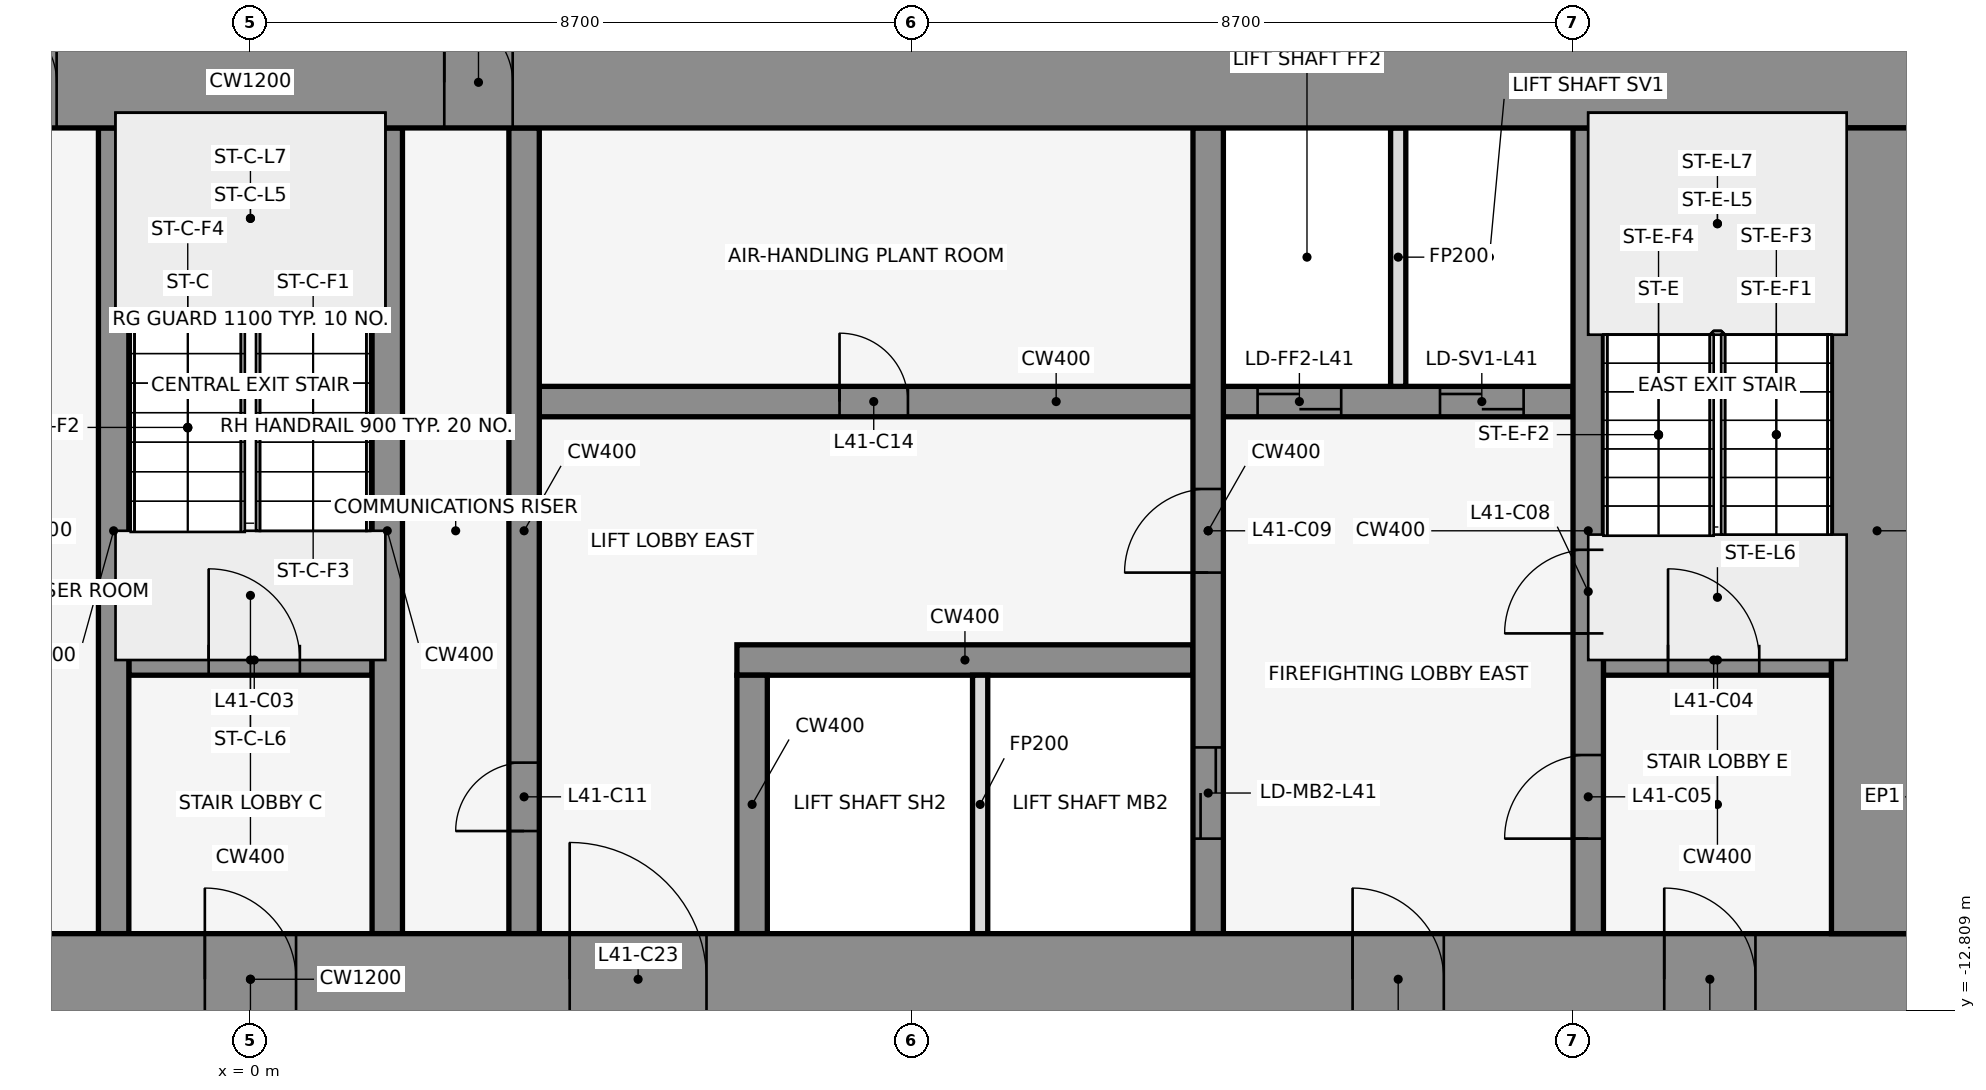
"""IFC4 building model, lengths in metres.
Left out: names, types, materials, properties, quantities, classifications, styles, units other than length and angle.
Written with IfcOpenShell. Run it as: python <this file> out.ifc"""

import sys

from ifc_helpers import new_model, si_unit, direction, frame, frame_2d, origin, place, context, subcontext, project, spatial, rectangle, extrude, element, fill, save


model = new_model("IFC4")
c1 = context("Model", 3, precision=1e-05, world=origin(), true_north=direction((0.0, 1.0)))
c2 = subcontext(c1, "Body", "Model", "MODEL_VIEW")
j1 = project(units=[si_unit("LENGTHUNIT", "METRE"), si_unit("PLANEANGLEUNIT", "RADIAN")], contexts=[c1])
p1 = place(None, origin())
s1 = spatial("IfcSite", under=j1, at=p1, CompositionType="ELEMENT")
p2 = place(p1, origin())
s2 = spatial("IfcBuilding", under=s1, at=p2, CompositionType="ELEMENT")
p3 = place(p2, frame((0.0, 0.0, 185.5)))
s3 = spatial("IfcBuildingStorey", under=s2, at=p3, CompositionType="ELEMENT", Elevation=185.5)
for number, where, z_axis, x_axis in (
    (1, (16.432, -0.105, 0.0), (0.0, 0.0, 1.0), (-0.84, 0.543, 0.0)),
    (2, (1.901, 1.08, 0.0), (0.0, 0.0, 1.0), (-0.84, -0.543, 0.0)),
    (3, (-0.068, -0.105, 0.0), (0.0, 0.0, 1.0), (-0.84, 0.543, 0.0)),
):
    element("IfcWall", number, at=place(p3, frame(where, z_axis=z_axis, x_axis=x_axis)), inside=s3, PredefinedType="STANDARD", context=c2, shape_type="SweptSolid", body=[
        extrude(rectangle(XDim=2.183, YDim=0.25, at=frame_2d((1.091, 0.0))), origin(), (0.0, 0.0, 1.0), 5.25),
    ])
p4 = place(p3, frame((-1.6, -8.2, 0.0), z_axis=(0.0, 0.0, 1.0), x_axis=(1.0, 0.0, 0.0)))
e4 = element("IfcWall", 4, at=p4, inside=s3, PredefinedType="SHEAR", context=c2, shape_type="SweptSolid", body=[
    extrude(rectangle(XDim=3.2, YDim=0.4, at=frame_2d((1.6, 0.0))), origin(), (0.0, 0.0, 1.0), 5.4),
])
p5 = place(p4, frame((1.05, 0.0, 0.0)))
e5 = element("IfcOpeningElement", 5, at=p5, cuts=e4, PredefinedType="OPENING", context=c2, shape_type="SweptSolid", body=[
    extrude(rectangle(XDim=1.2, YDim=2.1, at=frame_2d((0.6, 1.05))), frame((0.0, 0.212, 0.0), z_axis=(0.0, -1.0, 0.0), x_axis=(1.0, 0.0, 0.0)), (0.0, 0.0, 1.0), 0.424),
])
p6 = place(p3, frame((6.4, -8.2, 0.0), z_axis=(0.0, 0.0, 1.0), x_axis=(1.0, 0.0, 0.0)))
e6 = element("IfcWall", 6, at=p6, inside=s3, PredefinedType="SHEAR", context=c2, shape_type="SweptSolid", body=[
    extrude(rectangle(XDim=6.0, YDim=0.4, at=frame_2d((3.0, 0.0))), origin(), (0.0, 0.0, 1.0), 5.4),
])
p7 = place(p3, frame((17.8, -8.2, 0.0), z_axis=(0.0, 0.0, 1.0), x_axis=(1.0, 0.0, 0.0)))
e7 = element("IfcWall", 7, at=p7, inside=s3, PredefinedType="SHEAR", context=c2, shape_type="SweptSolid", body=[
    extrude(rectangle(XDim=3.0, YDim=0.4, at=frame_2d((1.5, 0.0))), origin(), (0.0, 0.0, 1.0), 5.4),
])
p8 = place(p7, frame((0.85, 0.0, 0.0)))
e8 = element("IfcOpeningElement", 8, at=p8, cuts=e7, PredefinedType="OPENING", context=c2, shape_type="SweptSolid", body=[
    extrude(rectangle(XDim=1.2, YDim=2.1, at=frame_2d((0.6, 1.05))), frame((0.0, 0.212, 0.0), z_axis=(0.0, -1.0, 0.0), x_axis=(1.0, 0.0, 0.0)), (0.0, 0.0, 1.0), 0.424),
])
p9 = place(p3, frame((3.8, -4.8, 0.0), z_axis=(0.0, 0.0, 1.0), x_axis=(1.0, 0.0, 0.0)))
e9 = element("IfcWall", 9, at=p9, inside=s3, PredefinedType="SHEAR", context=c2, shape_type="SweptSolid", body=[
    extrude(rectangle(XDim=13.6, YDim=0.4, at=frame_2d((6.8, 0.0))), origin(), (0.0, 0.0, 1.0), 5.4),
])
p10 = place(p9, frame((9.45, 0.0, 0.0)))
e10 = element("IfcOpeningElement", 10, at=p10, cuts=e9, PredefinedType="OPENING", context=c2, shape_type="SweptSolid", body=[
    extrude(rectangle(XDim=1.1, YDim=2.1, at=frame_2d((0.55, 1.05))), frame((0.0, 0.212, 0.0), z_axis=(0.0, -1.0, 0.0), x_axis=(1.0, 0.0, 0.0)), (0.0, 0.0, 1.0), 0.424),
])
p11 = place(p9, frame((11.85, 0.0, 0.0)))
e11 = element("IfcOpeningElement", 11, at=p11, cuts=e9, PredefinedType="OPENING", context=c2, shape_type="SweptSolid", body=[
    extrude(rectangle(XDim=1.1, YDim=2.1, at=frame_2d((0.55, 1.05))), frame((0.0, 0.212, 0.0), z_axis=(0.0, -1.0, 0.0), x_axis=(1.0, 0.0, 0.0)), (0.0, 0.0, 1.0), 0.424),
])
p12 = place(p9, frame((3.95, 0.0, 0.0)))
e12 = element("IfcOpeningElement", 12, at=p12, cuts=e9, PredefinedType="OPENING", context=c2, shape_type="SweptSolid", body=[
    extrude(rectangle(XDim=0.9, YDim=2.1, at=frame_2d((0.45, 1.05))), frame((0.0, 0.212, 0.0), z_axis=(0.0, -1.0, 0.0), x_axis=(1.0, 0.0, 0.0)), (0.0, 0.0, 1.0), 0.424),
])
for number, where, z_axis, x_axis in (
    (13, (-1.8, -11.8, 0.0), (0.0, 0.0, 1.0), (0.0, 1.0, 0.0)),
    (14, (1.8, -11.8, 0.0), (0.0, 0.0, 1.0), (0.0, 1.0, 0.0)),
):
    element("IfcWall", number, at=place(p3, frame(where, z_axis=z_axis, x_axis=x_axis)), inside=s3, PredefinedType="SHEAR", context=c2, shape_type="SweptSolid", body=[
        extrude(rectangle(XDim=10.6, YDim=0.4, at=frame_2d((5.3, 0.0))), origin(), (0.0, 0.0, 1.0), 5.4),
    ])
p13 = place(p3, frame((3.6, -11.8, 0.0), z_axis=(0.0, 0.0, 1.0), x_axis=(0.0, 1.0, 0.0)))
e15 = element("IfcWall", 15, at=p13, inside=s3, PredefinedType="SHEAR", context=c2, shape_type="SweptSolid", body=[
    extrude(rectangle(XDim=10.6, YDim=0.4, at=frame_2d((5.3, 0.0))), origin(), (0.0, 0.0, 1.0), 5.4),
])
p14 = place(p13, frame((1.35, 0.0, 0.0)))
e16 = element("IfcOpeningElement", 16, at=p14, cuts=e15, PredefinedType="OPENING", context=c2, shape_type="SweptSolid", body=[
    extrude(rectangle(XDim=0.9, YDim=2.1, at=frame_2d((0.45, 1.05))), frame((0.0, 0.212, 0.0), z_axis=(0.0, -1.0, 0.0), x_axis=(1.0, 0.0, 0.0)), (0.0, 0.0, 1.0), 0.424),
])
p15 = place(p3, frame((6.6, -11.8, 0.0), z_axis=(0.0, 0.0, 1.0), x_axis=(0.0, 1.0, 0.0)))
e17 = element("IfcWall", 17, at=p15, inside=s3, PredefinedType="SHEAR", context=c2, shape_type="SweptSolid", body=[
    extrude(rectangle(XDim=3.4, YDim=0.4, at=frame_2d((1.7, 0.0))), origin(), (0.0, 0.0, 1.0), 5.4),
])
p16 = place(p3, frame((9.6, -11.8, 0.0), z_axis=(0.0, 0.0, 1.0), x_axis=(0.0, 1.0, 0.0)))
e18 = element("IfcWall", 18, at=p16, inside=s3, PredefinedType="PARTITIONING", context=c2, shape_type="SweptSolid", body=[
    extrude(rectangle(XDim=3.4, YDim=0.2, at=frame_2d((1.7, 0.0))), origin(), (0.0, 0.0, 1.0), 4.26),
])
p17 = place(p3, frame((12.6, -11.8, 0.0), z_axis=(0.0, 0.0, 1.0), x_axis=(0.0, 1.0, 0.0)))
e19 = element("IfcWall", 19, at=p17, inside=s3, PredefinedType="SHEAR", context=c2, shape_type="SweptSolid", body=[
    extrude(rectangle(XDim=10.6, YDim=0.4, at=frame_2d((5.3, 0.0))), origin(), (0.0, 0.0, 1.0), 5.4),
])
p18 = place(p17, frame((1.25, 0.0, 0.0)))
e20 = element("IfcOpeningElement", 20, at=p18, cuts=e19, PredefinedType="OPENING", context=c2, shape_type="SweptSolid", body=[
    extrude(rectangle(XDim=1.2, YDim=2.1, at=frame_2d((0.6, 1.05))), frame((0.0, 0.212, 0.0), z_axis=(0.0, -1.0, 0.0), x_axis=(1.0, 0.0, 0.0)), (0.0, 0.0, 1.0), 0.424),
])
p19 = place(p17, frame((4.75, 0.0, 0.0)))
e21 = element("IfcOpeningElement", 21, at=p19, cuts=e19, PredefinedType="OPENING", context=c2, shape_type="SweptSolid", body=[
    extrude(rectangle(XDim=1.1, YDim=2.1, at=frame_2d((0.55, 1.05))), frame((0.0, 0.212, 0.0), z_axis=(0.0, -1.0, 0.0), x_axis=(1.0, 0.0, 0.0)), (0.0, 0.0, 1.0), 0.424),
])
p20 = place(p3, frame((15.1, -4.6, 0.0), z_axis=(0.0, 0.0, 1.0), x_axis=(0.0, 1.0, 0.0)))
e22 = element("IfcWall", 22, at=p20, inside=s3, PredefinedType="PARTITIONING", context=c2, shape_type="SweptSolid", body=[
    extrude(rectangle(XDim=3.4, YDim=0.2, at=frame_2d((1.7, 0.0))), origin(), (0.0, 0.0, 1.0), 4.26),
])
p21 = place(p3, frame((17.6, -11.8, 0.0), z_axis=(0.0, 0.0, 1.0), x_axis=(0.0, 1.0, 0.0)))
e23 = element("IfcWall", 23, at=p21, inside=s3, PredefinedType="SHEAR", context=c2, shape_type="SweptSolid", body=[
    extrude(rectangle(XDim=10.6, YDim=0.4, at=frame_2d((5.3, 0.0))), origin(), (0.0, 0.0, 1.0), 5.4),
])
p22 = place(p21, frame((1.25, 0.0, 0.0)))
e24 = element("IfcOpeningElement", 24, at=p22, cuts=e23, PredefinedType="OPENING", context=c2, shape_type="SweptSolid", body=[
    extrude(rectangle(XDim=1.1, YDim=2.1, at=frame_2d((0.55, 1.05))), frame((0.0, 0.212, 0.0), z_axis=(0.0, -1.0, 0.0), x_axis=(1.0, 0.0, 0.0)), (0.0, 0.0, 1.0), 0.424),
])
p23 = place(p21, frame((3.95, 0.0, 0.0)))
e25 = element("IfcOpeningElement", 25, at=p23, cuts=e23, PredefinedType="OPENING", context=c2, shape_type="SweptSolid", body=[
    extrude(rectangle(XDim=1.1, YDim=2.1, at=frame_2d((0.55, 1.05))), frame((0.0, 0.212, 0.0), z_axis=(0.0, -1.0, 0.0), x_axis=(1.0, 0.0, 0.0)), (0.0, 0.0, 1.0), 0.424),
])
p24 = place(p3, frame((-22.0, -0.6, 0.0), z_axis=(0.0, 0.0, 1.0), x_axis=(1.0, 0.0, 0.0)))
e26 = element("IfcWall", 26, at=p24, inside=s3, PredefinedType="SHEAR", context=c2, shape_type="SweptSolid", body=[
    extrude(rectangle(XDim=44.0, YDim=1.2, at=frame_2d((22.0, 0.0))), origin(), (0.0, 0.0, 1.0), 5.4),
])
p25 = place(p24, frame((18.55, 0.0, 0.0)))
e27 = element("IfcOpeningElement", 27, at=p25, cuts=e26, PredefinedType="OPENING", context=c2, shape_type="SweptSolid", body=[
    extrude(rectangle(XDim=0.9, YDim=2.1, at=frame_2d((0.45, 1.05))), frame((0.0, 0.612, 0.0), z_axis=(0.0, -1.0, 0.0), x_axis=(1.0, 0.0, 0.0)), (0.0, 0.0, 1.0), 1.224),
])
p26 = place(p24, frame((24.55, 0.0, 0.0)))
e28 = element("IfcOpeningElement", 28, at=p26, cuts=e26, PredefinedType="OPENING", context=c2, shape_type="SweptSolid", body=[
    extrude(rectangle(XDim=0.9, YDim=2.1, at=frame_2d((0.45, 1.05))), frame((0.0, 0.612, 0.0), z_axis=(0.0, -1.0, 0.0), x_axis=(1.0, 0.0, 0.0)), (0.0, 0.0, 1.0), 1.224),
])
p27 = place(p3, frame((-22.0, -12.4, 0.0), z_axis=(0.0, 0.0, 1.0), x_axis=(1.0, 0.0, 0.0)))
e29 = element("IfcWall", 29, at=p27, inside=s3, PredefinedType="SHEAR", context=c2, shape_type="SweptSolid", body=[
    extrude(rectangle(XDim=44.0, YDim=1.2, at=frame_2d((22.0, 0.0))), origin(), (0.0, 0.0, 1.0), 5.4),
])
p28 = place(p27, frame((2.2, 0.0, 0.0)))
e30 = element("IfcOpeningElement", 30, at=p28, cuts=e29, PredefinedType="OPENING", context=c2, shape_type="SweptSolid", body=[
    extrude(rectangle(XDim=1.2, YDim=2.1, at=frame_2d((0.6, 1.05))), frame((0.0, 0.612, 0.0), z_axis=(0.0, -1.0, 0.0), x_axis=(1.0, 0.0, 0.0)), (0.0, 0.0, 1.0), 1.224),
])
p29 = place(p27, frame((21.4, 0.0, 0.0)))
e31 = element("IfcOpeningElement", 31, at=p29, cuts=e29, PredefinedType="OPENING", context=c2, shape_type="SweptSolid", body=[
    extrude(rectangle(XDim=1.2, YDim=2.1, at=frame_2d((0.6, 1.05))), frame((0.0, 0.612, 0.0), z_axis=(0.0, -1.0, 0.0), x_axis=(1.0, 0.0, 0.0)), (0.0, 0.0, 1.0), 1.224),
])
p30 = place(p27, frame((40.6, 0.0, 0.0)))
e32 = element("IfcOpeningElement", 32, at=p30, cuts=e29, PredefinedType="OPENING", context=c2, shape_type="SweptSolid", body=[
    extrude(rectangle(XDim=1.2, YDim=2.1, at=frame_2d((0.6, 1.05))), frame((0.0, 0.612, 0.0), z_axis=(0.0, -1.0, 0.0), x_axis=(1.0, 0.0, 0.0)), (0.0, 0.0, 1.0), 1.224),
])
p31 = place(p27, frame((16.0, 0.0, 0.0)))
e33 = element("IfcOpeningElement", 33, at=p31, cuts=e29, PredefinedType="OPENING", context=c2, shape_type="SweptSolid", body=[
    extrude(rectangle(XDim=1.8, YDim=2.1, at=frame_2d((0.9, 1.05))), frame((0.0, 0.612, 0.0), z_axis=(0.0, -1.0, 0.0), x_axis=(1.0, 0.0, 0.0)), (0.0, 0.0, 1.0), 1.224),
])
p32 = place(p27, frame((6.3, 0.0, 0.0)))
e34 = element("IfcOpeningElement", 34, at=p32, cuts=e29, PredefinedType="OPENING", context=c2, shape_type="SweptSolid", body=[
    extrude(rectangle(XDim=1.2, YDim=2.1, at=frame_2d((0.6, 1.05))), frame((0.0, 0.612, 0.0), z_axis=(0.0, -1.0, 0.0), x_axis=(1.0, 0.0, 0.0)), (0.0, 0.0, 1.0), 1.224),
])
p33 = place(p27, frame((26.2, 0.0, 0.0)))
e35 = element("IfcOpeningElement", 35, at=p33, cuts=e29, PredefinedType="OPENING", context=c2, shape_type="SweptSolid", body=[
    extrude(rectangle(XDim=1.8, YDim=2.1, at=frame_2d((0.9, 1.05))), frame((0.0, 0.612, 0.0), z_axis=(0.0, -1.0, 0.0), x_axis=(1.0, 0.0, 0.0)), (0.0, 0.0, 1.0), 1.224),
])
p34 = place(p27, frame((36.5, 0.0, 0.0)))
e36 = element("IfcOpeningElement", 36, at=p34, cuts=e29, PredefinedType="OPENING", context=c2, shape_type="SweptSolid", body=[
    extrude(rectangle(XDim=1.2, YDim=2.1, at=frame_2d((0.6, 1.05))), frame((0.0, 0.612, 0.0), z_axis=(0.0, -1.0, 0.0), x_axis=(1.0, 0.0, 0.0)), (0.0, 0.0, 1.0), 1.224),
])
p35 = place(p3, frame((21.4, -11.8, 0.0), z_axis=(0.0, 0.0, 1.0), x_axis=(0.0, 1.0, 0.0)))
e37 = element("IfcWall", 37, at=p35, inside=s3, PredefinedType="SHEAR", context=c2, shape_type="SweptSolid", body=[
    extrude(rectangle(XDim=10.6, YDim=1.2, at=frame_2d((5.3, 0.0))), origin(), (0.0, 0.0, 1.0), 5.4),
])
p36 = place(p5, origin())
e38 = element("IfcDoor", 38, at=p36, inside=s3, OperationType="SINGLE_SWING_LEFT", PredefinedType="DOOR", context=c2, shape_type="SweptSolid", body=[
    extrude(rectangle(XDim=1.2, YDim=2.1, at=frame_2d((0.6, 1.05))), frame((0.0, 0.025, 0.0), z_axis=(0.0, -1.0, 0.0), x_axis=(1.0, 0.0, 0.0)), (0.0, 0.0, 1.0), 0.05),
])
fill(e5, e38)
p37 = place(p8, origin())
e39 = element("IfcDoor", 39, at=p37, inside=s3, OperationType="SINGLE_SWING_RIGHT", PredefinedType="DOOR", context=c2, shape_type="SweptSolid", body=[
    extrude(rectangle(XDim=1.2, YDim=2.1, at=frame_2d((0.6, 1.05))), frame((0.0, 0.025, 0.0), z_axis=(0.0, -1.0, 0.0), x_axis=(1.0, 0.0, 0.0)), (0.0, 0.0, 1.0), 0.05),
])
fill(e8, e39)
p38 = place(p22, origin())
e40 = element("IfcDoor", 40, at=p38, inside=s3, OperationType="SINGLE_SWING_LEFT", PredefinedType="DOOR", context=c2, shape_type="SweptSolid", body=[
    extrude(rectangle(XDim=1.1, YDim=2.1, at=frame_2d((0.55, 1.05))), frame((0.0, 0.025, 0.0), z_axis=(0.0, -1.0, 0.0), x_axis=(1.0, 0.0, 0.0)), (0.0, 0.0, 1.0), 0.05),
])
fill(e24, e40)
p39 = place(p18, origin())
e41 = element("IfcDoor", 41, at=p39, inside=s3, OperationType="DOUBLE_DOOR_SLIDING", PredefinedType="DOOR", context=c2, shape_type="SweptSolid", body=[
    extrude(rectangle(XDim=1.2, YDim=2.1, at=frame_2d((0.6, 1.05))), frame((0.0, 0.025, 0.0), z_axis=(0.0, -1.0, 0.0), x_axis=(1.0, 0.0, 0.0)), (0.0, 0.0, 1.0), 0.05),
])
fill(e20, e41)
p40 = place(p10, origin())
e42 = element("IfcDoor", 42, at=p40, inside=s3, OperationType="DOUBLE_DOOR_SLIDING", PredefinedType="DOOR", context=c2, shape_type="SweptSolid", body=[
    extrude(rectangle(XDim=1.1, YDim=2.1, at=frame_2d((0.55, 1.05))), frame((0.0, 0.025, 0.0), z_axis=(0.0, -1.0, 0.0), x_axis=(1.0, 0.0, 0.0)), (0.0, 0.0, 1.0), 0.05),
])
fill(e10, e42)
p41 = place(p11, origin())
e43 = element("IfcDoor", 43, at=p41, inside=s3, OperationType="DOUBLE_DOOR_SLIDING", PredefinedType="DOOR", context=c2, shape_type="SweptSolid", body=[
    extrude(rectangle(XDim=1.1, YDim=2.1, at=frame_2d((0.55, 1.05))), frame((0.0, 0.025, 0.0), z_axis=(0.0, -1.0, 0.0), x_axis=(1.0, 0.0, 0.0)), (0.0, 0.0, 1.0), 0.05),
])
fill(e11, e43)
p42 = place(p23, origin())
e44 = element("IfcDoor", 44, at=p42, inside=s3, OperationType="SINGLE_SWING_RIGHT", PredefinedType="DOOR", context=c2, shape_type="SweptSolid", body=[
    extrude(rectangle(XDim=1.1, YDim=2.1, at=frame_2d((0.55, 1.05))), frame((0.0, 0.025, 0.0), z_axis=(0.0, -1.0, 0.0), x_axis=(1.0, 0.0, 0.0)), (0.0, 0.0, 1.0), 0.05),
])
fill(e25, e44)
p43 = place(p19, frame((1.1, 0.0, 0.0), z_axis=(0.0, 0.0, 1.0), x_axis=(-1.0, 0.0, 0.0)))
e45 = element("IfcDoor", 45, at=p43, inside=s3, OperationType="SINGLE_SWING_RIGHT", PredefinedType="DOOR", context=c2, shape_type="SweptSolid", body=[
    extrude(rectangle(XDim=1.1, YDim=2.1, at=frame_2d((0.55, 1.05))), frame((0.0, 0.025, 0.0), z_axis=(0.0, -1.0, 0.0), x_axis=(1.0, 0.0, 0.0)), (0.0, 0.0, 1.0), 0.05),
])
fill(e21, e45)
p44 = place(p14, origin())
e46 = element("IfcDoor", 46, at=p44, inside=s3, OperationType="SINGLE_SWING_LEFT", PredefinedType="DOOR", context=c2, shape_type="SweptSolid", body=[
    extrude(rectangle(XDim=0.9, YDim=2.1, at=frame_2d((0.45, 1.05))), frame((0.0, 0.025, 0.0), z_axis=(0.0, -1.0, 0.0), x_axis=(1.0, 0.0, 0.0)), (0.0, 0.0, 1.0), 0.05),
])
fill(e16, e46)
p45 = place(p12, origin())
e47 = element("IfcDoor", 47, at=p45, inside=s3, OperationType="SINGLE_SWING_RIGHT", PredefinedType="DOOR", context=c2, shape_type="SweptSolid", body=[
    extrude(rectangle(XDim=0.9, YDim=2.1, at=frame_2d((0.45, 1.05))), frame((0.0, 0.025, 0.0), z_axis=(0.0, -1.0, 0.0), x_axis=(1.0, 0.0, 0.0)), (0.0, 0.0, 1.0), 0.05),
])
fill(e12, e47)
p46 = place(p25, origin())
e48 = element("IfcDoor", 48, at=p46, inside=s3, OperationType="SINGLE_SWING_LEFT", PredefinedType="DOOR", context=c2, shape_type="SweptSolid", body=[
    extrude(rectangle(XDim=0.9, YDim=2.1, at=frame_2d((0.45, 1.05))), frame((0.0, 0.025, 0.0), z_axis=(0.0, -1.0, 0.0), x_axis=(1.0, 0.0, 0.0)), (0.0, 0.0, 1.0), 0.05),
])
fill(e27, e48)
p47 = place(p26, origin())
e49 = element("IfcDoor", 49, at=p47, inside=s3, OperationType="SINGLE_SWING_LEFT", PredefinedType="DOOR", context=c2, shape_type="SweptSolid", body=[
    extrude(rectangle(XDim=0.9, YDim=2.1, at=frame_2d((0.45, 1.05))), frame((0.0, 0.025, 0.0), z_axis=(0.0, -1.0, 0.0), x_axis=(1.0, 0.0, 0.0)), (0.0, 0.0, 1.0), 0.05),
])
fill(e28, e49)
p48 = place(p29, frame((1.2, 0.0, 0.0), z_axis=(0.0, 0.0, 1.0), x_axis=(-1.0, 0.0, 0.0)))
e50 = element("IfcDoor", 50, at=p48, inside=s3, OperationType="SINGLE_SWING_RIGHT", PredefinedType="DOOR", context=c2, shape_type="SweptSolid", body=[
    extrude(rectangle(XDim=1.2, YDim=2.1, at=frame_2d((0.6, 1.05))), frame((0.0, 0.025, 0.0), z_axis=(0.0, -1.0, 0.0), x_axis=(1.0, 0.0, 0.0)), (0.0, 0.0, 1.0), 0.05),
])
fill(e31, e50)
p49 = place(p30, frame((1.2, 0.0, 0.0), z_axis=(0.0, 0.0, 1.0), x_axis=(-1.0, 0.0, 0.0)))
e51 = element("IfcDoor", 51, at=p49, inside=s3, OperationType="SINGLE_SWING_RIGHT", PredefinedType="DOOR", context=c2, shape_type="SweptSolid", body=[
    extrude(rectangle(XDim=1.2, YDim=2.1, at=frame_2d((0.6, 1.05))), frame((0.0, 0.025, 0.0), z_axis=(0.0, -1.0, 0.0), x_axis=(1.0, 0.0, 0.0)), (0.0, 0.0, 1.0), 0.05),
])
fill(e32, e51)
p50 = place(p33, origin())
e52 = element("IfcDoor", 52, at=p50, inside=s3, OperationType="SINGLE_SWING_LEFT", PredefinedType="DOOR", context=c2, shape_type="SweptSolid", body=[
    extrude(rectangle(XDim=1.8, YDim=2.1, at=frame_2d((0.9, 1.05))), frame((0.0, 0.025, 0.0), z_axis=(0.0, -1.0, 0.0), x_axis=(1.0, 0.0, 0.0)), (0.0, 0.0, 1.0), 0.05),
])
fill(e35, e52)
p51 = place(p34, frame((1.2, 0.0, 0.0), z_axis=(0.0, 0.0, 1.0), x_axis=(-1.0, 0.0, 0.0)))
e53 = element("IfcDoor", 53, at=p51, inside=s3, OperationType="SINGLE_SWING_RIGHT", PredefinedType="DOOR", context=c2, shape_type="SweptSolid", body=[
    extrude(rectangle(XDim=1.2, YDim=2.1, at=frame_2d((0.6, 1.05))), frame((0.0, 0.025, 0.0), z_axis=(0.0, -1.0, 0.0), x_axis=(1.0, 0.0, 0.0)), (0.0, 0.0, 1.0), 0.05),
])
fill(e36, e53)
save(model, sys.argv[1])
